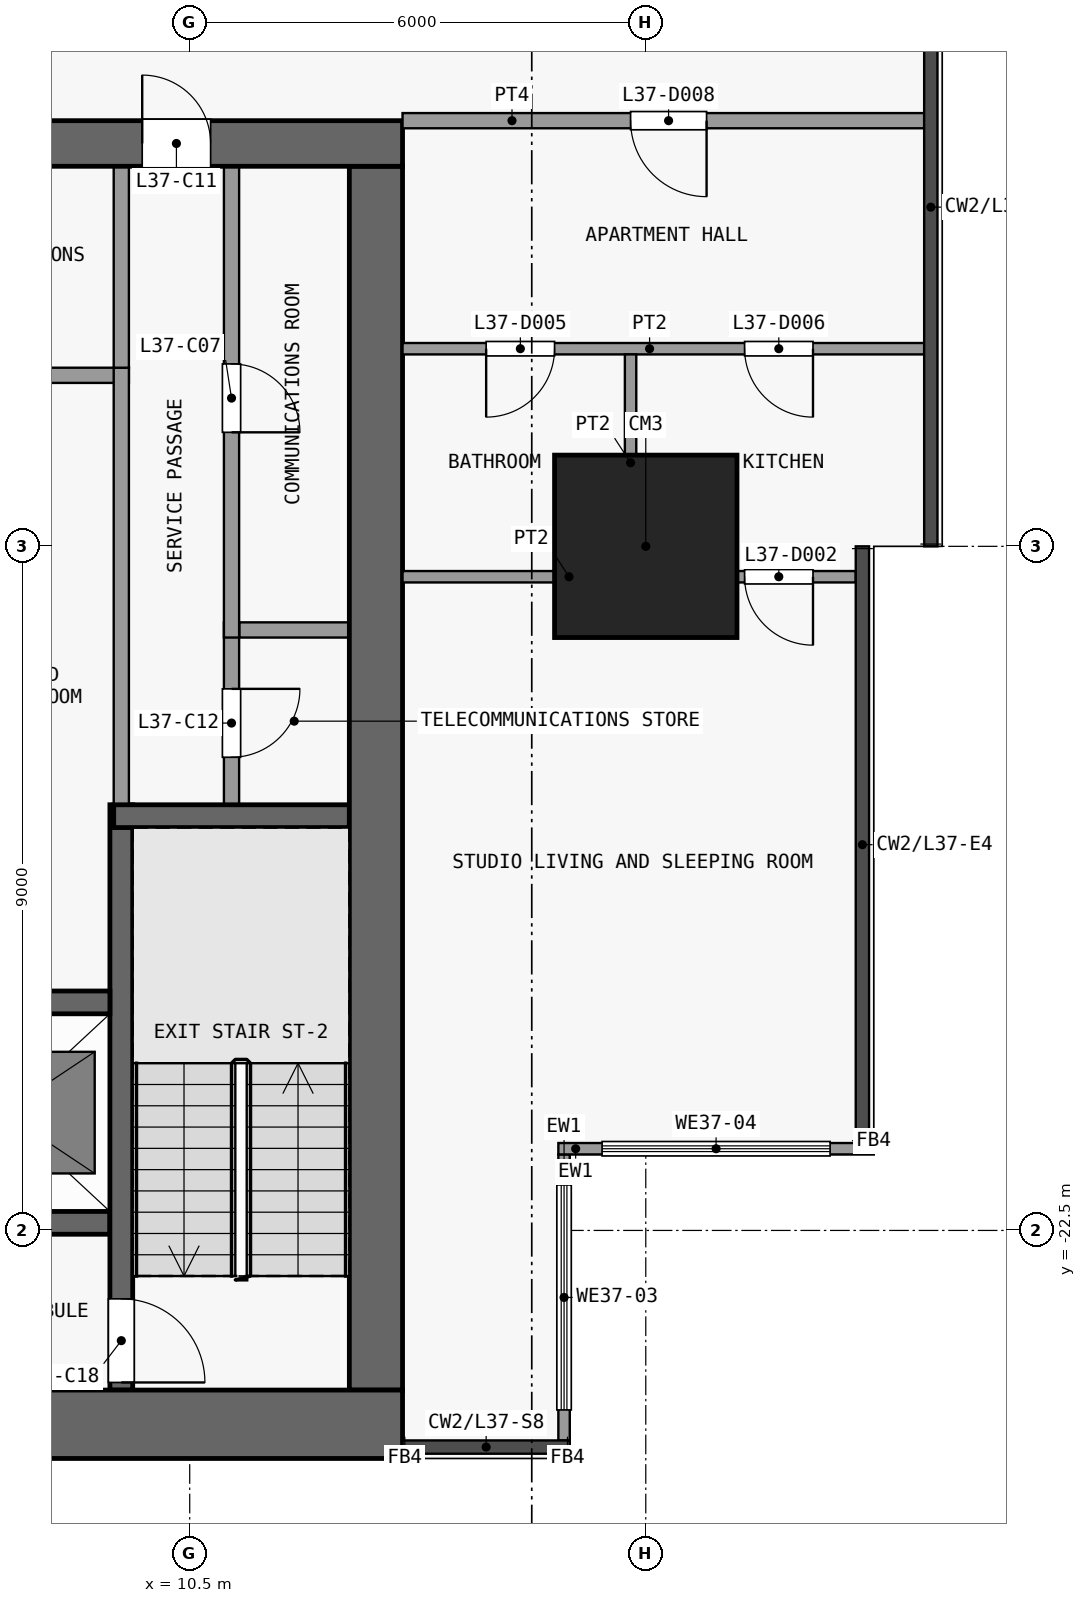
"""IFC4 building model, lengths in metres.
Left out: names, types, materials, properties, quantities, classifications, styles, units other than length and angle.
Written with IfcOpenShell. Run it as: python <this file> out.ifc"""

import sys

from ifc_helpers import new_model, si_unit, direction, frame, frame_2d, origin, origin_2d, place, context, subcontext, project, spatial, rectangle, extrude, element, fill, save


model = new_model("IFC4")
c1 = context("Model", 3, precision=1e-05, world=origin(), true_north=direction((0.0, 1.0)))
c2 = subcontext(c1, "Body", "Model", "MODEL_VIEW")
j1 = project(units=[si_unit("LENGTHUNIT", "METRE"), si_unit("PLANEANGLEUNIT", "RADIAN")], contexts=[c1])
p1 = place(None, origin())
s1 = spatial("IfcSite", under=j1, at=p1, CompositionType="ELEMENT")
p2 = place(p1, origin())
s2 = spatial("IfcBuilding", under=s1, at=p2, CompositionType="ELEMENT")
p3 = place(p2, frame((0.0, 0.0, 152.9)))
s3 = spatial("IfcBuildingStorey", under=s2, at=p3, CompositionType="ELEMENT", Elevation=152.9)
p4 = place(p3, frame((16.5, -13.5, 0.0), z_axis=(0.0, 0.0, 1.0), x_axis=(1.0, 0.0, 0.0)))
e1 = element("IfcColumn", 1, at=p4, inside=s3, PredefinedType="COLUMN", context=c2, shape_type="SweptSolid", body=[
    extrude(rectangle(XDim=2.4, YDim=2.4, at=origin_2d()), origin(), (0.0, 0.0, 1.0), 3.6),
])
p5 = place(p3, frame((-13.3, -25.05, 0.0), z_axis=(0.0, 0.0, 1.0), x_axis=(1.0, 0.0, 0.0)))
e2 = element("IfcWall", 2, at=p5, inside=s3, PredefinedType="SHEAR", context=c2, shape_type="SweptSolid", body=[
    extrude(rectangle(XDim=26.6, YDim=0.9, at=frame_2d((13.3, 0.0))), origin(), (0.0, 0.0, 1.0), 3.3),
])
p6 = place(p3, frame((-13.3, -8.2, 0.0), z_axis=(0.0, 0.0, 1.0), x_axis=(1.0, 0.0, 0.0)))
e3 = element("IfcWall", 3, at=p6, inside=s3, PredefinedType="SHEAR", context=c2, shape_type="SweptSolid", body=[
    extrude(rectangle(XDim=26.6, YDim=0.6, at=frame_2d((13.3, 0.0))), origin(), (0.0, 0.0, 1.0), 3.3),
])
p7 = place(p6, frame((7.6, 0.0, 0.0)))
e4 = element("IfcOpeningElement", 4, at=p7, cuts=e3, PredefinedType="OPENING", context=c2, shape_type="SweptSolid", body=[
    extrude(rectangle(XDim=1.8, YDim=2.1, at=frame_2d((0.9, 1.05))), frame((0.0, 0.31, 0.0), z_axis=(0.0, -1.0, 0.0), x_axis=(1.0, 0.0, 0.0)), (0.0, 0.0, 1.0), 0.62),
])
p8 = place(p6, frame((17.2, 0.0, 0.0)))
e5 = element("IfcOpeningElement", 5, at=p8, cuts=e3, PredefinedType="OPENING", context=c2, shape_type="SweptSolid", body=[
    extrude(rectangle(XDim=1.8, YDim=2.1, at=frame_2d((0.9, 1.05))), frame((0.0, 0.31, 0.0), z_axis=(0.0, -1.0, 0.0), x_axis=(1.0, 0.0, 0.0)), (0.0, 0.0, 1.0), 0.62),
])
p9 = place(p6, frame((1.525, 0.0, 0.0)))
e6 = element("IfcOpeningElement", 6, at=p9, cuts=e3, PredefinedType="OPENING", context=c2, shape_type="SweptSolid", body=[
    extrude(rectangle(XDim=1.2, YDim=2.1, at=frame_2d((0.6, 1.05))), frame((0.0, 0.31, 0.0), z_axis=(0.0, -1.0, 0.0), x_axis=(1.0, 0.0, 0.0)), (0.0, 0.0, 1.0), 0.62),
])
p10 = place(p6, frame((23.175, 0.0, 0.0)))
e7 = element("IfcOpeningElement", 7, at=p10, cuts=e3, PredefinedType="OPENING", context=c2, shape_type="SweptSolid", body=[
    extrude(rectangle(XDim=0.9, YDim=2.1, at=frame_2d((0.45, 1.05))), frame((0.0, 0.31, 0.0), z_axis=(0.0, -1.0, 0.0), x_axis=(1.0, 0.0, 0.0)), (0.0, 0.0, 1.0), 0.62),
])
p11 = place(p3, frame((12.95, -24.6, 0.0), z_axis=(0.0, 0.0, 1.0), x_axis=(0.0, 1.0, 0.0)))
e8 = element("IfcWall", 8, at=p11, inside=s3, PredefinedType="SHEAR", context=c2, shape_type="SweptSolid", body=[
    extrude(rectangle(XDim=16.1, YDim=0.7, at=frame_2d((8.05, 0.0))), origin(), (0.0, 0.0, 1.0), 3.3),
])
p12 = place(p3, frame((6.35, -22.4, 0.0), z_axis=(0.0, 0.0, 1.0), x_axis=(1.0, 0.0, 0.0)))
e9 = element("IfcWall", 9, at=p12, inside=s3, PredefinedType="SHEAR", context=c2, shape_type="SweptSolid", body=[
    extrude(rectangle(XDim=3.1, YDim=0.3, at=frame_2d((1.55, 0.0))), origin(), (0.0, 0.0, 1.0), 3.3),
])
p13 = place(p3, frame((6.425, -19.5, 0.0), z_axis=(0.0, 0.0, 1.0), x_axis=(1.0, 0.0, 0.0)))
e10 = element("IfcWall", 10, at=p13, inside=s3, PredefinedType="SHEAR", context=c2, shape_type="SweptSolid", body=[
    extrude(rectangle(XDim=3.025, YDim=0.3, at=frame_2d((1.512, 0.0))), origin(), (0.0, 0.0, 1.0), 3.3),
])
p14 = place(p3, frame((9.5, -17.05, 0.0), z_axis=(0.0, 0.0, 1.0), x_axis=(1.0, 0.0, 0.0)))
e11 = element("IfcWall", 11, at=p14, inside=s3, PredefinedType="SHEAR", context=c2, shape_type="SweptSolid", body=[
    extrude(rectangle(XDim=3.1, YDim=0.3, at=frame_2d((1.55, 0.0))), origin(), (0.0, 0.0, 1.0), 3.3),
])
p15 = place(p3, frame((11.15, -14.6, 0.0), z_axis=(0.0, 0.0, 1.0), x_axis=(1.0, 0.0, 0.0)))
e12 = element("IfcWall", 12, at=p15, inside=s3, PredefinedType="PARTITIONING", context=c2, shape_type="SweptSolid", body=[
    extrude(rectangle(XDim=1.45, YDim=0.2, at=frame_2d((0.725, 0.0))), origin(), (0.0, 0.0, 1.0), 3.3),
])
p16 = place(p3, frame((6.4, -11.25, 0.0), z_axis=(0.0, 0.0, 1.0), x_axis=(1.0, 0.0, 0.0)))
e13 = element("IfcWall", 13, at=p16, inside=s3, PredefinedType="PARTITIONING", context=c2, shape_type="SweptSolid", body=[
    extrude(rectangle(XDim=3.3, YDim=0.2, at=frame_2d((1.65, 0.0))), origin(), (0.0, 0.0, 1.0), 3.3),
])
p17 = place(p3, frame((9.6, -16.9, 0.0), z_axis=(0.0, 0.0, 1.0), x_axis=(0.0, -1.0, 0.0)))
e14 = element("IfcWall", 14, at=p17, inside=s3, PredefinedType="SHEAR", context=c2, shape_type="SweptSolid", body=[
    extrude(rectangle(XDim=7.7, YDim=0.3, at=frame_2d((3.85, 0.0))), origin(), (0.0, 0.0, 1.0), 3.3),
])
p18 = place(p17, frame((6.5, 0.0, 0.0)))
e15 = element("IfcOpeningElement", 15, at=p18, cuts=e14, PredefinedType="OPENING", context=c2, shape_type="SweptSolid", body=[
    extrude(rectangle(XDim=1.1, YDim=2.1, at=frame_2d((0.55, 1.05))), frame((0.0, 0.16, 0.0), z_axis=(0.0, -1.0, 0.0), x_axis=(1.0, 0.0, 0.0)), (0.0, 0.0, 1.0), 0.32),
])
p19 = place(p3, frame((9.6, -16.9, 0.0), z_axis=(0.0, 0.0, 1.0), x_axis=(0.0, 1.0, 0.0)))
e16 = element("IfcWall", 16, at=p19, inside=s3, PredefinedType="PARTITIONING", context=c2, shape_type="SweptSolid", body=[
    extrude(rectangle(XDim=5.75, YDim=0.2, at=frame_2d((2.875, 0.0))), origin(), (0.0, 0.0, 1.0), 3.3),
])
p20 = place(p3, frame((9.6, -11.15, 0.0), z_axis=(0.0, 0.0, 1.0), x_axis=(0.0, 1.0, 0.0)))
e17 = element("IfcWall", 17, at=p20, inside=s3, PredefinedType="PARTITIONING", context=c2, shape_type="SweptSolid", body=[
    extrude(rectangle(XDim=2.65, YDim=0.2, at=frame_2d((1.325, 0.0))), origin(), (0.0, 0.0, 1.0), 3.3),
])
p21 = place(p3, frame((11.05, -14.5, 0.0), z_axis=(0.0, 0.0, 1.0), x_axis=(0.0, -1.0, 0.0)))
e18 = element("IfcWall", 18, at=p21, inside=s3, PredefinedType="PARTITIONING", context=c2, shape_type="SweptSolid", body=[
    extrude(rectangle(XDim=2.4, YDim=0.2, at=frame_2d((1.2, 0.0))), origin(), (0.0, 0.0, 1.0), 3.3),
])
p22 = place(p21, frame((0.875, 0.0, 0.0)))
e19 = element("IfcOpeningElement", 19, at=p22, cuts=e18, PredefinedType="OPENING", context=c2, shape_type="SweptSolid", body=[
    extrude(rectangle(XDim=0.9, YDim=2.1, at=frame_2d((0.45, 1.05))), frame((0.0, 0.11, 0.0), z_axis=(0.0, -1.0, 0.0), x_axis=(1.0, 0.0, 0.0)), (0.0, 0.0, 1.0), 0.22),
])
p23 = place(p3, frame((11.05, -8.5, 0.0), z_axis=(0.0, 0.0, 1.0), x_axis=(0.0, -1.0, 0.0)))
e20 = element("IfcWall", 20, at=p23, inside=s3, PredefinedType="PARTITIONING", context=c2, shape_type="SweptSolid", body=[
    extrude(rectangle(XDim=6.2, YDim=0.2, at=frame_2d((3.1, 0.0))), origin(), (0.0, 0.0, 1.0), 3.3),
])
p24 = place(p23, frame((2.6, 0.0, 0.0)))
e21 = element("IfcOpeningElement", 21, at=p24, cuts=e20, PredefinedType="OPENING", context=c2, shape_type="SweptSolid", body=[
    extrude(rectangle(XDim=0.9, YDim=2.1, at=frame_2d((0.45, 1.05))), frame((0.0, 0.11, 0.0), z_axis=(0.0, -1.0, 0.0), x_axis=(1.0, 0.0, 0.0)), (0.0, 0.0, 1.0), 0.22),
])
p25 = place(p3, frame((15.425, -21.5, 0.0), z_axis=(0.0, 0.0, 1.0), x_axis=(0.0, -1.0, 0.0)))
e22 = element("IfcWall", 22, at=p25, inside=s3, PredefinedType="SOLIDWALL", context=c2, shape_type="SweptSolid", body=[
    extrude(rectangle(XDim=3.762, YDim=0.15, at=frame_2d((1.881, 0.0))), origin(), (0.0, 0.0, 1.0), 3.3),
])
p26 = place(p25, frame((0.401, 0.0, 0.9)))
e23 = element("IfcOpeningElement", 23, at=p26, cuts=e22, PredefinedType="OPENING", context=c2, shape_type="SweptSolid", body=[
    extrude(rectangle(XDim=2.96, YDim=2.4, at=frame_2d((1.48, 1.2))), frame((0.0, 0.085, 0.0), z_axis=(0.0, -1.0, 0.0), x_axis=(1.0, 0.0, 0.0)), (0.0, 0.0, 1.0), 0.17),
])
p27 = place(p3, frame((19.5, -21.425, 0.0), z_axis=(0.0, 0.0, 1.0), x_axis=(-1.0, 0.0, 0.0)))
e24 = element("IfcWall", 24, at=p27, inside=s3, PredefinedType="SOLIDWALL", context=c2, shape_type="SweptSolid", body=[
    extrude(rectangle(XDim=4.15, YDim=0.15, at=frame_2d((2.075, 0.0))), origin(), (0.0, 0.0, 1.0), 3.3),
])
p28 = place(p27, frame((0.575, 0.0, 0.9)))
e25 = element("IfcOpeningElement", 25, at=p28, cuts=e24, PredefinedType="OPENING", context=c2, shape_type="SweptSolid", body=[
    extrude(rectangle(XDim=3.0, YDim=2.4, at=frame_2d((1.5, 1.2))), frame((0.0, 0.085, 0.0), z_axis=(0.0, -1.0, 0.0), x_axis=(1.0, 0.0, 0.0)), (0.0, 0.0, 1.0), 0.17),
])
p29 = place(p3, frame((13.3, -13.9, 0.0), z_axis=(0.0, 0.0, 1.0), x_axis=(1.0, 0.0, 0.0)))
e26 = element("IfcWall", 26, at=p29, inside=s3, PredefinedType="PARTITIONING", context=c2, shape_type="SweptSolid", body=[
    extrude(rectangle(XDim=5.962, YDim=0.15, at=frame_2d((2.981, 0.0))), origin(), (0.0, 0.0, 1.0), 3.3),
])
p30 = place(p29, frame((4.5, 0.0, 0.0)))
e27 = element("IfcOpeningElement", 27, at=p30, cuts=e26, PredefinedType="OPENING", context=c2, shape_type="SweptSolid", body=[
    extrude(rectangle(XDim=0.9, YDim=2.1, at=frame_2d((0.45, 1.05))), frame((0.0, 0.085, 0.0), z_axis=(0.0, -1.0, 0.0), x_axis=(1.0, 0.0, 0.0)), (0.0, 0.0, 1.0), 0.17),
])
p31 = place(p3, frame((13.3, -10.9, 0.0), z_axis=(0.0, 0.0, 1.0), x_axis=(1.0, 0.0, 0.0)))
e28 = element("IfcWall", 28, at=p31, inside=s3, PredefinedType="PARTITIONING", context=c2, shape_type="SweptSolid", body=[
    extrude(rectangle(XDim=6.863, YDim=0.15, at=frame_2d((3.431, 0.0))), origin(), (0.0, 0.0, 1.0), 3.3),
])
p32 = place(p31, frame((1.1, 0.0, 0.0)))
e29 = element("IfcOpeningElement", 29, at=p32, cuts=e28, PredefinedType="OPENING", context=c2, shape_type="SweptSolid", body=[
    extrude(rectangle(XDim=0.9, YDim=2.1, at=frame_2d((0.45, 1.05))), frame((0.0, 0.085, 0.0), z_axis=(0.0, -1.0, 0.0), x_axis=(1.0, 0.0, 0.0)), (0.0, 0.0, 1.0), 0.17),
])
p33 = place(p31, frame((4.5, 0.0, 0.0)))
e30 = element("IfcOpeningElement", 30, at=p33, cuts=e28, PredefinedType="OPENING", context=c2, shape_type="SweptSolid", body=[
    extrude(rectangle(XDim=0.9, YDim=2.1, at=frame_2d((0.45, 1.05))), frame((0.0, 0.085, 0.0), z_axis=(0.0, -1.0, 0.0), x_axis=(1.0, 0.0, 0.0)), (0.0, 0.0, 1.0), 0.17),
])
p34 = place(p3, frame((13.3, -7.9, 0.0), z_axis=(0.0, 0.0, 1.0), x_axis=(1.0, 0.0, 0.0)))
e31 = element("IfcWall", 31, at=p34, inside=s3, PredefinedType="PARTITIONING", context=c2, shape_type="SweptSolid", body=[
    extrude(rectangle(XDim=6.863, YDim=0.2, at=frame_2d((3.431, 0.0))), origin(), (0.0, 0.0, 1.0), 3.3),
])
p35 = place(p34, frame((3.0, 0.0, 0.0)))
e32 = element("IfcOpeningElement", 32, at=p35, cuts=e31, PredefinedType="OPENING", context=c2, shape_type="SweptSolid", body=[
    extrude(rectangle(XDim=1.0, YDim=2.1, at=frame_2d((0.5, 1.05))), frame((0.0, 0.11, 0.0), z_axis=(0.0, -1.0, 0.0), x_axis=(1.0, 0.0, 0.0)), (0.0, 0.0, 1.0), 0.22),
])
p36 = place(p3, frame((16.3, -13.825, 0.0), z_axis=(0.0, 0.0, 1.0), x_axis=(0.0, 1.0, 0.0)))
e33 = element("IfcWall", 33, at=p36, inside=s3, PredefinedType="PARTITIONING", context=c2, shape_type="SweptSolid", body=[
    extrude(rectangle(XDim=2.85, YDim=0.15, at=frame_2d((1.425, 0.0))), origin(), (0.0, 0.0, 1.0), 3.3),
])
p37 = place(p24, origin())
e34 = element("IfcDoor", 34, at=p37, inside=s3, OperationType="SINGLE_SWING_RIGHT", PredefinedType="DOOR", context=c2, shape_type="SweptSolid", body=[
    extrude(rectangle(XDim=0.9, YDim=2.1, at=frame_2d((0.45, 1.05))), frame((0.0, 0.025, 0.0), z_axis=(0.0, -1.0, 0.0), x_axis=(1.0, 0.0, 0.0)), (0.0, 0.0, 1.0), 0.05),
])
fill(e21, e34)
p38 = place(p10, origin())
e35 = element("IfcDoor", 35, at=p38, inside=s3, OperationType="SINGLE_SWING_LEFT", PredefinedType="DOOR", context=c2, shape_type="SweptSolid", body=[
    extrude(rectangle(XDim=0.9, YDim=2.1, at=frame_2d((0.45, 1.05))), frame((0.0, 0.025, 0.0), z_axis=(0.0, -1.0, 0.0), x_axis=(1.0, 0.0, 0.0)), (0.0, 0.0, 1.0), 0.05),
])
fill(e7, e35)
p39 = place(p22, origin())
e36 = element("IfcDoor", 36, at=p39, inside=s3, OperationType="SINGLE_SWING_LEFT", PredefinedType="DOOR", context=c2, shape_type="SweptSolid", body=[
    extrude(rectangle(XDim=0.9, YDim=2.1, at=frame_2d((0.45, 1.05))), frame((0.0, 0.025, 0.0), z_axis=(0.0, -1.0, 0.0), x_axis=(1.0, 0.0, 0.0)), (0.0, 0.0, 1.0), 0.05),
])
fill(e19, e36)
p40 = place(p18, origin())
e37 = element("IfcDoor", 37, at=p40, inside=s3, OperationType="SINGLE_SWING_RIGHT", PredefinedType="DOOR", context=c2, shape_type="SweptSolid", body=[
    extrude(rectangle(XDim=1.1, YDim=2.1, at=frame_2d((0.55, 1.05))), frame((0.0, 0.025, 0.0), z_axis=(0.0, -1.0, 0.0), x_axis=(1.0, 0.0, 0.0)), (0.0, 0.0, 1.0), 0.05),
])
fill(e15, e37)
p41 = place(p26, origin())
e38 = element("IfcWindow", 38, at=p41, inside=s3, PartitioningType="SINGLE_PANEL", PredefinedType="WINDOW", context=c2, shape_type="SweptSolid", body=[
    extrude(rectangle(XDim=2.96, YDim=2.4, at=frame_2d((1.48, 1.2))), frame((0.0, 0.03, 0.0), z_axis=(0.0, -1.0, 0.0), x_axis=(1.0, 0.0, 0.0)), (0.0, 0.0, 1.0), 0.06),
])
fill(e23, e38)
p42 = place(p28, origin())
e39 = element("IfcWindow", 39, at=p42, inside=s3, PartitioningType="SINGLE_PANEL", PredefinedType="WINDOW", context=c2, shape_type="SweptSolid", body=[
    extrude(rectangle(XDim=3.0, YDim=2.4, at=frame_2d((1.5, 1.2))), frame((0.0, 0.03, 0.0), z_axis=(0.0, -1.0, 0.0), x_axis=(1.0, 0.0, 0.0)), (0.0, 0.0, 1.0), 0.06),
])
fill(e25, e39)
p43 = place(p30, origin())
e40 = element("IfcDoor", 40, at=p43, inside=s3, OperationType="SINGLE_SWING_RIGHT", PredefinedType="DOOR", context=c2, shape_type="SweptSolid", body=[
    extrude(rectangle(XDim=0.9, YDim=2.1, at=frame_2d((0.45, 1.05))), frame((0.0, 0.025, 0.0), z_axis=(0.0, -1.0, 0.0), x_axis=(1.0, 0.0, 0.0)), (0.0, 0.0, 1.0), 0.05),
])
fill(e27, e40)
p44 = place(p32, origin())
e41 = element("IfcDoor", 41, at=p44, inside=s3, OperationType="SINGLE_SWING_LEFT", PredefinedType="DOOR", context=c2, shape_type="SweptSolid", body=[
    extrude(rectangle(XDim=0.9, YDim=2.1, at=frame_2d((0.45, 1.05))), frame((0.0, 0.025, 0.0), z_axis=(0.0, -1.0, 0.0), x_axis=(1.0, 0.0, 0.0)), (0.0, 0.0, 1.0), 0.05),
])
fill(e29, e41)
p45 = place(p33, origin())
e42 = element("IfcDoor", 42, at=p45, inside=s3, OperationType="SINGLE_SWING_RIGHT", PredefinedType="DOOR", context=c2, shape_type="SweptSolid", body=[
    extrude(rectangle(XDim=0.9, YDim=2.1, at=frame_2d((0.45, 1.05))), frame((0.0, 0.025, 0.0), z_axis=(0.0, -1.0, 0.0), x_axis=(1.0, 0.0, 0.0)), (0.0, 0.0, 1.0), 0.05),
])
fill(e30, e42)
p46 = place(p35, origin())
e43 = element("IfcDoor", 43, at=p46, inside=s3, OperationType="SINGLE_SWING_RIGHT", PredefinedType="DOOR", context=c2, shape_type="SweptSolid", body=[
    extrude(rectangle(XDim=1.0, YDim=2.1, at=frame_2d((0.5, 1.05))), frame((0.0, 0.025, 0.0), z_axis=(0.0, -1.0, 0.0), x_axis=(1.0, 0.0, 0.0)), (0.0, 0.0, 1.0), 0.05),
])
fill(e32, e43)
save(model, sys.argv[1])
